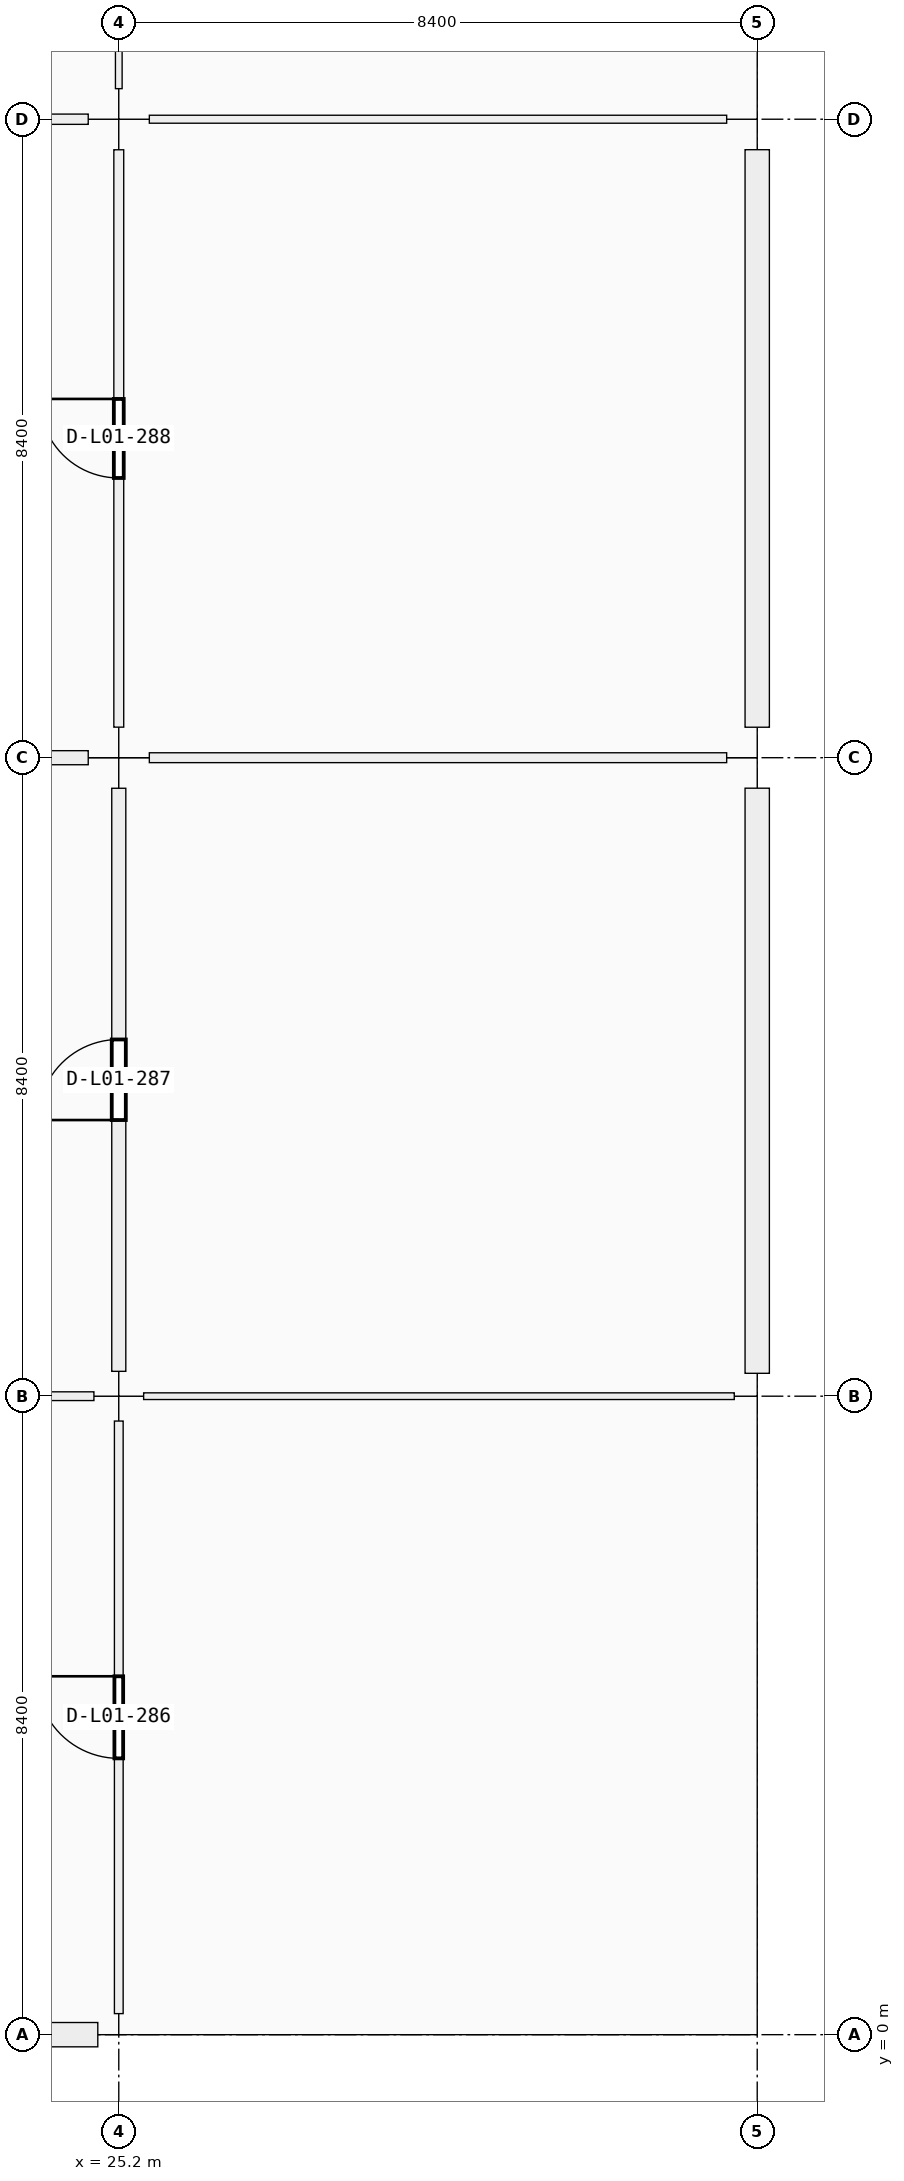
"""IFC4 building model, lengths in metres.
Left out: names, types, materials, properties, quantities, classifications, styles, units other than length and angle.
Written with IfcOpenShell. Run it as: python <this file> out.ifc"""

import sys

from ifc_helpers import new_model, si_unit, direction, frame, frame_2d, origin, origin_2d, place, context, subcontext, project, spatial, rectangle, extrude, element, fill, save


model = new_model("IFC4")
c1 = context("Model", 3, precision=1e-05, world=origin(), true_north=direction((0.0, 1.0)))
c2 = subcontext(c1, "Body", "Model", "MODEL_VIEW")
j1 = project(units=[si_unit("LENGTHUNIT", "METRE"), si_unit("PLANEANGLEUNIT", "RADIAN")], contexts=[c1])
p1 = place(None, origin())
s1 = spatial("IfcSite", under=j1, at=p1, CompositionType="ELEMENT")
p2 = place(p1, origin())
s2 = spatial("IfcBuilding", under=s1, at=p2, CompositionType="ELEMENT")
p3 = place(p2, frame((0.0, 0.0, 5.76)))
s3 = spatial("IfcBuildingStorey", under=s2, at=p3, CompositionType="ELEMENT", Elevation=5.76)
p4 = place(p3, frame((25.2, 0.0, 0.0), z_axis=(0.0, 0.0, 1.0), x_axis=(1.0, 0.0, 0.0)))
e1 = element("IfcColumn", 1, at=p4, inside=s3, PredefinedType="COLUMN", context=c2, shape_type="SweptSolid", body=[
    extrude(rectangle(XDim=0.55, YDim=0.55, at=origin_2d()), origin(), (0.0, 0.0, 1.0), 4.2),
])
p5 = place(p3, frame((25.2, 8.4, 0.0), z_axis=(0.0, 0.0, 1.0), x_axis=(1.0, 0.0, 0.0)))
e2 = element("IfcColumn", 2, at=p5, inside=s3, PredefinedType="COLUMN", context=c2, shape_type="SweptSolid", body=[
    extrude(rectangle(XDim=0.65, YDim=0.65, at=origin_2d()), origin(), (0.0, 0.0, 1.0), 4.5),
])
for number, where, z_axis, x_axis in (
    (3, (25.2, 16.8, 0.0), (0.0, 0.0, 1.0), (1.0, 0.0, 0.0)),
    (4, (25.2, 25.2, 0.0), (0.0, 0.0, 1.0), (1.0, 0.0, 0.0)),
):
    element("IfcColumn", number, at=place(p3, frame(where, z_axis=z_axis, x_axis=x_axis)), inside=s3, PredefinedType="COLUMN", context=c2, shape_type="SweptSolid", body=[
        extrude(rectangle(XDim=0.8, YDim=0.8, at=origin_2d()), origin(), (0.0, 0.0, 1.0), 4.5),
    ])
p6 = place(p3, frame((33.6, 0.0, 0.0), z_axis=(0.0, 0.0, 1.0), x_axis=(1.0, 0.0, 0.0)))
e5 = element("IfcColumn", 5, at=p6, inside=s3, PredefinedType="COLUMN", context=c2, shape_type="SweptSolid", body=[
    extrude(rectangle(XDim=0.55, YDim=0.55, at=origin_2d()), origin(), (0.0, 0.0, 1.0), 4.2),
])
p7 = place(p3, frame((33.6, 8.4, 0.0), z_axis=(0.0, 0.0, 1.0), x_axis=(1.0, 0.0, 0.0)))
e6 = element("IfcColumn", 6, at=p7, inside=s3, PredefinedType="COLUMN", context=c2, shape_type="SweptSolid", body=[
    extrude(rectangle(XDim=0.6, YDim=0.6, at=origin_2d()), origin(), (0.0, 0.0, 1.0), 4.5),
])
for number, where, z_axis, x_axis in (
    (7, (33.6, 16.8, 0.0), (0.0, 0.0, 1.0), (1.0, 0.0, 0.0)),
    (8, (33.6, 25.2, 0.0), (0.0, 0.0, 1.0), (1.0, 0.0, 0.0)),
):
    element("IfcColumn", number, at=place(p3, frame(where, z_axis=z_axis, x_axis=x_axis)), inside=s3, PredefinedType="COLUMN", context=c2, shape_type="SweptSolid", body=[
        extrude(rectangle(XDim=0.8, YDim=0.8, at=origin_2d()), origin(), (0.0, 0.0, 1.0), 4.5),
    ])
p8 = place(p3, frame((24.924, 0.0, 0.0), z_axis=(0.0, 0.0, 1.0), x_axis=(-1.0, 0.0, 0.0)))
e9 = element("IfcWall", 9, at=p8, inside=s3, PredefinedType="SOLIDWALL", context=c2, shape_type="SweptSolid", body=[
    extrude(rectangle(XDim=7.848, YDim=0.32, at=frame_2d((3.924, 0.0))), origin(), (0.0, 0.0, 1.0), 3.4),
])
p9 = place(p8, frame((3.374, 0.0, 0.9)))
e10 = element("IfcOpeningElement", 10, at=p9, cuts=e9, PredefinedType="OPENING", context=c2, shape_type="SweptSolid", body=[
    extrude(rectangle(XDim=1.1, YDim=1.5, at=frame_2d((0.55, 0.75))), frame((0.0, 0.16, 0.0), z_axis=(0.0, -1.0, 0.0), x_axis=(1.0, 0.0, 0.0)), (0.0, 0.0, 1.0), 0.32),
])
p10 = place(p3, frame((33.6, 16.399, 0.0), z_axis=(0.0, 0.0, 1.0), x_axis=(0.0, -1.0, 0.0)))
e11 = element("IfcWall", 11, at=p10, inside=s3, PredefinedType="SOLIDWALL", context=c2, shape_type="SweptSolid", body=[
    extrude(rectangle(XDim=7.698, YDim=0.32, at=frame_2d((3.849, 0.0))), origin(), (0.0, 0.0, 1.0), 3.4),
])
p11 = place(p10, frame((2.699, 0.0, 0.9)))
e12 = element("IfcOpeningElement", 12, at=p11, cuts=e11, PredefinedType="OPENING", context=c2, shape_type="SweptSolid", body=[
    extrude(rectangle(XDim=2.3, YDim=1.85, at=frame_2d((1.15, 0.925))), frame((0.0, 0.16, 0.0), z_axis=(0.0, -1.0, 0.0), x_axis=(1.0, 0.0, 0.0)), (0.0, 0.0, 1.0), 0.32),
])
p12 = place(p3, frame((33.6, 24.799, 0.0), z_axis=(0.0, 0.0, 1.0), x_axis=(0.0, -1.0, 0.0)))
e13 = element("IfcWall", 13, at=p12, inside=s3, PredefinedType="SOLIDWALL", context=c2, shape_type="SweptSolid", body=[
    extrude(rectangle(XDim=7.598, YDim=0.32, at=frame_2d((3.799, 0.0))), origin(), (0.0, 0.0, 1.0), 3.4),
])
p13 = place(p12, frame((2.349, 0.0, 0.9)))
e14 = element("IfcOpeningElement", 14, at=p13, cuts=e13, PredefinedType="OPENING", context=c2, shape_type="SweptSolid", body=[
    extrude(rectangle(XDim=2.9, YDim=1.85, at=frame_2d((1.45, 0.925))), frame((0.0, 0.16, 0.0), z_axis=(0.0, -1.0, 0.0), x_axis=(1.0, 0.0, 0.0)), (0.0, 0.0, 1.0), 0.32),
])
p14 = place(p3, frame((17.102, 8.4, 0.0), z_axis=(0.0, 0.0, 1.0), x_axis=(1.0, 0.0, 0.0)))
e15 = element("IfcWall", 15, at=p14, inside=s3, PredefinedType="PARTITIONING", context=c2, shape_type="SweptSolid", body=[
    extrude(rectangle(XDim=7.771, YDim=0.115, at=frame_2d((3.885, 0.0))), origin(), (0.0, 0.0, 1.0), 2.4),
])
p15 = place(p14, frame((3.361, 0.0, 0.0)))
e16 = element("IfcOpeningElement", 16, at=p15, cuts=e15, PredefinedType="OPENING", context=c2, shape_type="SweptSolid", body=[
    extrude(rectangle(XDim=1.05, YDim=2.12, at=frame_2d((0.525, 1.06))), frame((0.0, 0.058, 0.0), z_axis=(0.0, -1.0, 0.0), x_axis=(1.0, 0.0, 0.0)), (0.0, 0.0, 1.0), 0.115),
])
p16 = place(p3, frame((17.202, 16.8, 0.0), z_axis=(0.0, 0.0, 1.0), x_axis=(1.0, 0.0, 0.0)))
e17 = element("IfcWall", 17, at=p16, inside=s3, PredefinedType="PARTITIONING", context=c2, shape_type="SweptSolid", body=[
    extrude(rectangle(XDim=7.596, YDim=0.185, at=frame_2d((3.798, 0.0))), origin(), (0.0, 0.0, 1.0), 2.4),
])
p17 = place(p16, frame((3.268, 0.0, 0.0)))
e18 = element("IfcOpeningElement", 18, at=p17, cuts=e17, PredefinedType="OPENING", context=c2, shape_type="SweptSolid", body=[
    extrude(rectangle(XDim=1.06, YDim=2.22, at=frame_2d((0.53, 1.11))), frame((0.0, 0.093, 0.0), z_axis=(0.0, -1.0, 0.0), x_axis=(1.0, 0.0, 0.0)), (0.0, 0.0, 1.0), 0.185),
])
p18 = place(p3, frame((17.202, 25.2, 0.0), z_axis=(0.0, 0.0, 1.0), x_axis=(1.0, 0.0, 0.0)))
e19 = element("IfcWall", 19, at=p18, inside=s3, PredefinedType="PARTITIONING", context=c2, shape_type="SweptSolid", body=[
    extrude(rectangle(XDim=7.596, YDim=0.135, at=frame_2d((3.798, 0.0))), origin(), (0.0, 0.0, 1.0), 2.4),
])
p19 = place(p18, frame((3.338, 0.0, 0.0)))
e20 = element("IfcOpeningElement", 20, at=p19, cuts=e19, PredefinedType="OPENING", context=c2, shape_type="SweptSolid", body=[
    extrude(rectangle(XDim=0.92, YDim=2.15, at=frame_2d((0.46, 1.075))), frame((0.0, 0.067, 0.0), z_axis=(0.0, -1.0, 0.0), x_axis=(1.0, 0.0, 0.0)), (0.0, 0.0, 1.0), 0.135),
])
p20 = place(p3, frame((25.527, 8.4, 0.0), z_axis=(0.0, 0.0, 1.0), x_axis=(1.0, 0.0, 0.0)))
e21 = element("IfcWall", 21, at=p20, inside=s3, PredefinedType="PARTITIONING", context=c2, shape_type="SweptSolid", body=[
    extrude(rectangle(XDim=7.771, YDim=0.088, at=frame_2d((3.885, 0.0))), origin(), (0.0, 0.0, 1.0), 2.4),
])
p21 = place(p20, frame((3.381, 0.0, 0.0)))
e22 = element("IfcOpeningElement", 22, at=p21, cuts=e21, PredefinedType="OPENING", context=c2, shape_type="SweptSolid", body=[
    extrude(rectangle(XDim=1.01, YDim=2.12, at=frame_2d((0.505, 1.06))), frame((0.0, 0.044, 0.0), z_axis=(0.0, -1.0, 0.0), x_axis=(1.0, 0.0, 0.0)), (0.0, 0.0, 1.0), 0.088),
])
p22 = place(p3, frame((25.602, 16.8, 0.0), z_axis=(0.0, 0.0, 1.0), x_axis=(1.0, 0.0, 0.0)))
e23 = element("IfcWall", 23, at=p22, inside=s3, PredefinedType="MOVABLE", context=c2, shape_type="SweptSolid", body=[
    extrude(rectangle(XDim=7.596, YDim=0.13, at=frame_2d((3.798, 0.0))), origin(), (0.0, 0.0, 1.0), 2.4),
])
p23 = place(p22, frame((3.313, 0.0, 0.0)))
e24 = element("IfcOpeningElement", 24, at=p23, cuts=e23, PredefinedType="OPENING", context=c2, shape_type="SweptSolid", body=[
    extrude(rectangle(XDim=0.97, YDim=2.12, at=frame_2d((0.485, 1.06))), frame((0.0, 0.065, 0.0), z_axis=(0.0, -1.0, 0.0), x_axis=(1.0, 0.0, 0.0)), (0.0, 0.0, 1.0), 0.13),
])
p24 = place(p3, frame((25.602, 25.2, 0.0), z_axis=(0.0, 0.0, 1.0), x_axis=(1.0, 0.0, 0.0)))
e25 = element("IfcWall", 25, at=p24, inside=s3, PredefinedType="PARTITIONING", context=c2, shape_type="SweptSolid", body=[
    extrude(rectangle(XDim=7.596, YDim=0.105, at=frame_2d((3.798, 0.0))), origin(), (0.0, 0.0, 1.0), 2.4),
])
p25 = place(p24, frame((3.278, 0.0, 0.0)))
e26 = element("IfcOpeningElement", 26, at=p25, cuts=e25, PredefinedType="OPENING", context=c2, shape_type="SweptSolid", body=[
    extrude(rectangle(XDim=1.04, YDim=2.2, at=frame_2d((0.52, 1.1))), frame((0.0, 0.052, 0.0), z_axis=(0.0, -1.0, 0.0), x_axis=(1.0, 0.0, 0.0)), (0.0, 0.0, 1.0), 0.105),
])
p26 = place(p3, frame((25.2, 0.277, 0.0), z_axis=(0.0, 0.0, 1.0), x_axis=(0.0, 1.0, 0.0)))
e27 = element("IfcWall", 27, at=p26, inside=s3, PredefinedType="PARTITIONING", context=c2, shape_type="SweptSolid", body=[
    extrude(rectangle(XDim=7.796, YDim=0.115, at=frame_2d((3.898, 0.0))), origin(), (0.0, 0.0, 1.0), 2.4),
])
p27 = place(p26, frame((3.358, 0.0, 0.0)))
e28 = element("IfcOpeningElement", 28, at=p27, cuts=e27, PredefinedType="OPENING", context=c2, shape_type="SweptSolid", body=[
    extrude(rectangle(XDim=1.08, YDim=2.22, at=frame_2d((0.54, 1.11))), frame((0.0, 0.058, 0.0), z_axis=(0.0, -1.0, 0.0), x_axis=(1.0, 0.0, 0.0)), (0.0, 0.0, 1.0), 0.115),
])
p28 = place(p3, frame((25.2, 8.727, 0.0), z_axis=(0.0, 0.0, 1.0), x_axis=(0.0, 1.0, 0.0)))
e29 = element("IfcWall", 29, at=p28, inside=s3, PredefinedType="PARTITIONING", context=c2, shape_type="SweptSolid", body=[
    extrude(rectangle(XDim=7.671, YDim=0.185, at=frame_2d((3.835, 0.0))), origin(), (0.0, 0.0, 1.0), 2.4),
])
p29 = place(p28, frame((3.306, 0.0, 0.0)))
e30 = element("IfcOpeningElement", 30, at=p29, cuts=e29, PredefinedType="OPENING", context=c2, shape_type="SweptSolid", body=[
    extrude(rectangle(XDim=1.06, YDim=2.22, at=frame_2d((0.53, 1.11))), frame((0.0, 0.093, 0.0), z_axis=(0.0, -1.0, 0.0), x_axis=(1.0, 0.0, 0.0)), (0.0, 0.0, 1.0), 0.185),
])
p30 = place(p3, frame((25.2, 17.202, 0.0), z_axis=(0.0, 0.0, 1.0), x_axis=(0.0, 1.0, 0.0)))
e31 = element("IfcWall", 31, at=p30, inside=s3, PredefinedType="MOVABLE", context=c2, shape_type="SweptSolid", body=[
    extrude(rectangle(XDim=7.596, YDim=0.13, at=frame_2d((3.798, 0.0))), origin(), (0.0, 0.0, 1.0), 2.4),
])
p31 = place(p30, frame((3.278, 0.0, 0.0)))
e32 = element("IfcOpeningElement", 32, at=p31, cuts=e31, PredefinedType="OPENING", context=c2, shape_type="SweptSolid", body=[
    extrude(rectangle(XDim=1.04, YDim=2.2, at=frame_2d((0.52, 1.1))), frame((0.0, 0.065, 0.0), z_axis=(0.0, -1.0, 0.0), x_axis=(1.0, 0.0, 0.0)), (0.0, 0.0, 1.0), 0.13),
])
p32 = place(p3, frame((25.2, 25.602, 0.0), z_axis=(0.0, 0.0, 1.0), x_axis=(0.0, 1.0, 0.0)))
e33 = element("IfcWall", 33, at=p32, inside=s3, PredefinedType="PARTITIONING", context=c2, shape_type="SweptSolid", body=[
    extrude(rectangle(XDim=7.596, YDim=0.088, at=frame_2d((3.798, 0.0))), origin(), (0.0, 0.0, 1.0), 2.4),
])
p33 = place(p32, frame((3.268, 0.0, 0.0)))
e34 = element("IfcOpeningElement", 34, at=p33, cuts=e33, PredefinedType="OPENING", context=c2, shape_type="SweptSolid", body=[
    extrude(rectangle(XDim=1.06, YDim=2.22, at=frame_2d((0.53, 1.11))), frame((0.0, 0.044, 0.0), z_axis=(0.0, -1.0, 0.0), x_axis=(1.0, 0.0, 0.0)), (0.0, 0.0, 1.0), 0.088),
])
p34 = place(p11, origin())
e35 = element("IfcWindow", 35, at=p34, inside=s3, PartitioningType="SINGLE_PANEL", PredefinedType="WINDOW", context=c2, shape_type="SweptSolid", body=[
    extrude(rectangle(XDim=2.3, YDim=1.85, at=frame_2d((1.15, 0.925))), frame((0.0, 0.03, 0.0), z_axis=(0.0, -1.0, 0.0), x_axis=(1.0, 0.0, 0.0)), (0.0, 0.0, 1.0), 0.06),
])
fill(e12, e35)
p35 = place(p13, origin())
e36 = element("IfcWindow", 36, at=p35, inside=s3, PartitioningType="SINGLE_PANEL", PredefinedType="WINDOW", context=c2, shape_type="SweptSolid", body=[
    extrude(rectangle(XDim=2.9, YDim=1.85, at=frame_2d((1.45, 0.925))), frame((0.0, 0.03, 0.0), z_axis=(0.0, -1.0, 0.0), x_axis=(1.0, 0.0, 0.0)), (0.0, 0.0, 1.0), 0.06),
])
fill(e14, e36)
p36 = place(p21, origin())
e37 = element("IfcDoor", 37, at=p36, inside=s3, OperationType="SINGLE_SWING_LEFT", PredefinedType="DOOR", context=c2, shape_type="SweptSolid", body=[
    extrude(rectangle(XDim=1.01, YDim=2.12, at=frame_2d((0.505, 1.06))), frame((0.0, 0.025, 0.0), z_axis=(0.0, -1.0, 0.0), x_axis=(1.0, 0.0, 0.0)), (0.0, 0.0, 1.0), 0.05),
])
fill(e22, e37)
p37 = place(p23, origin())
e38 = element("IfcDoor", 38, at=p37, inside=s3, OperationType="SINGLE_SWING_RIGHT", PredefinedType="DOOR", context=c2, shape_type="SweptSolid", body=[
    extrude(rectangle(XDim=0.97, YDim=2.12, at=frame_2d((0.485, 1.06))), frame((0.0, 0.025, 0.0), z_axis=(0.0, -1.0, 0.0), x_axis=(1.0, 0.0, 0.0)), (0.0, 0.0, 1.0), 0.05),
])
fill(e24, e38)
p38 = place(p25, origin())
e39 = element("IfcDoor", 39, at=p38, inside=s3, OperationType="SINGLE_SWING_RIGHT", PredefinedType="DOOR", context=c2, shape_type="SweptSolid", body=[
    extrude(rectangle(XDim=1.04, YDim=2.2, at=frame_2d((0.52, 1.1))), frame((0.0, 0.025, 0.0), z_axis=(0.0, -1.0, 0.0), x_axis=(1.0, 0.0, 0.0)), (0.0, 0.0, 1.0), 0.05),
])
fill(e26, e39)
p39 = place(p27, origin())
e40 = element("IfcDoor", 40, at=p39, inside=s3, OperationType="SINGLE_SWING_RIGHT", PredefinedType="DOOR", context=c2, shape_type="SweptSolid", body=[
    extrude(rectangle(XDim=1.08, YDim=2.22, at=frame_2d((0.54, 1.11))), frame((0.0, 0.025, 0.0), z_axis=(0.0, -1.0, 0.0), x_axis=(1.0, 0.0, 0.0)), (0.0, 0.0, 1.0), 0.05),
])
fill(e28, e40)
p40 = place(p29, origin())
e41 = element("IfcDoor", 41, at=p40, inside=s3, OperationType="SINGLE_SWING_LEFT", PredefinedType="DOOR", context=c2, shape_type="SweptSolid", body=[
    extrude(rectangle(XDim=1.06, YDim=2.22, at=frame_2d((0.53, 1.11))), frame((0.0, 0.025, 0.0), z_axis=(0.0, -1.0, 0.0), x_axis=(1.0, 0.0, 0.0)), (0.0, 0.0, 1.0), 0.05),
])
fill(e30, e41)
p41 = place(p31, origin())
e42 = element("IfcDoor", 42, at=p41, inside=s3, OperationType="SINGLE_SWING_RIGHT", PredefinedType="DOOR", context=c2, shape_type="SweptSolid", body=[
    extrude(rectangle(XDim=1.04, YDim=2.2, at=frame_2d((0.52, 1.1))), frame((0.0, 0.025, 0.0), z_axis=(0.0, -1.0, 0.0), x_axis=(1.0, 0.0, 0.0)), (0.0, 0.0, 1.0), 0.05),
])
fill(e32, e42)
save(model, sys.argv[1])
